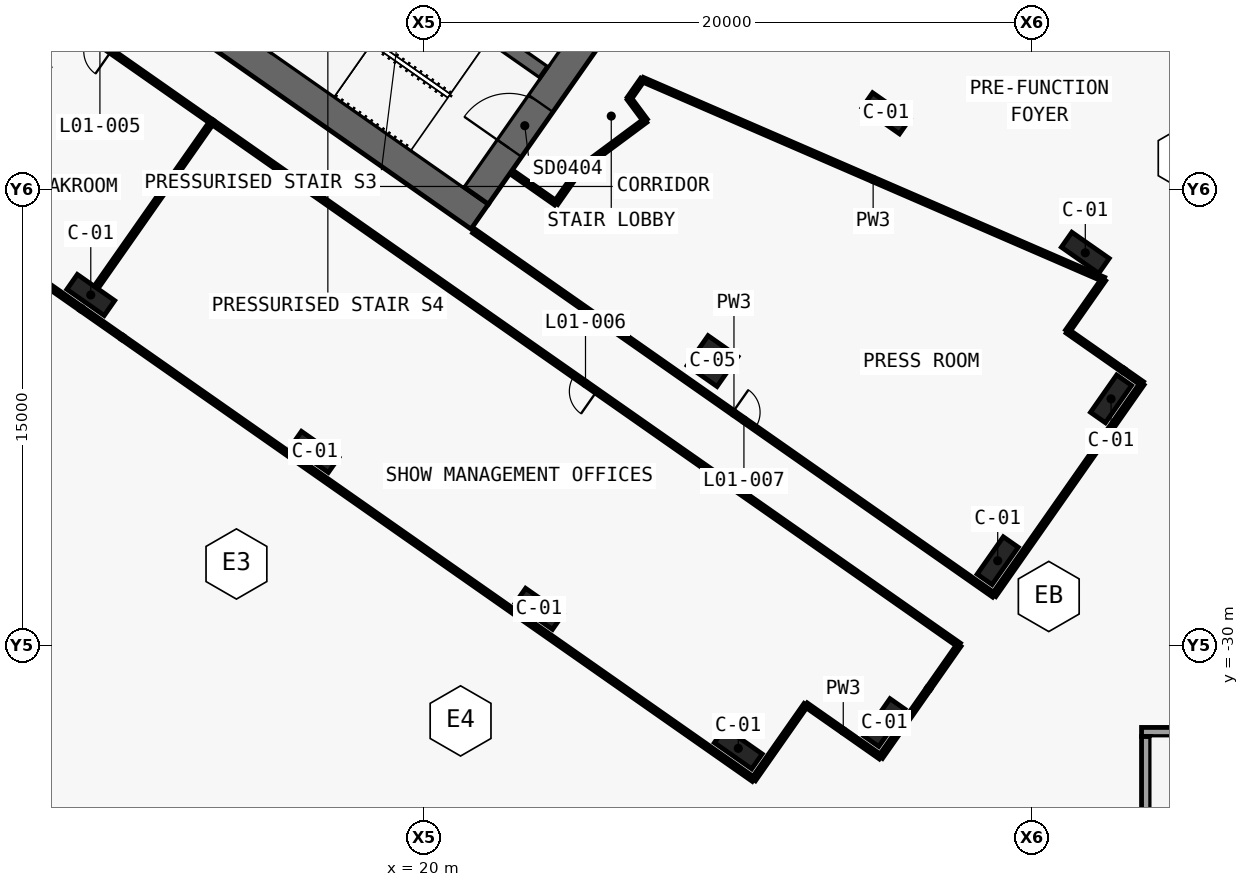
"""IFC4 building model, lengths in metres.
Left out: names, types, materials, properties, quantities, classifications, styles, units other than length and angle.
Written with IfcOpenShell. Run it as: python <this file> out.ifc"""

import sys

from ifc_helpers import new_model, si_unit, direction, frame, frame_2d, origin, origin_2d, place, context, subcontext, project, spatial, polyline, rectangle, outline, extrude, element, fill, save


model = new_model("IFC4")
c1 = context("Model", 3, precision=1e-05, world=origin(), true_north=direction((0.0, 1.0)))
c2 = subcontext(c1, "Body", "Model", "MODEL_VIEW")
j1 = project(units=[si_unit("LENGTHUNIT", "METRE"), si_unit("PLANEANGLEUNIT", "RADIAN")], contexts=[c1])
p1 = place(None, origin())
s1 = spatial("IfcSite", under=j1, at=p1, CompositionType="ELEMENT")
p2 = place(p1, origin())
s2 = spatial("IfcBuilding", under=s1, at=p2, CompositionType="ELEMENT")
p3 = place(p2, frame((0.0, 0.0, 9.0)))
s3 = spatial("IfcBuildingStorey", under=s2, at=p3, CompositionType="ELEMENT", Elevation=9.0)
p4 = place(p3, frame((-0.037, -0.585, 0.0), z_axis=(0.0, 0.0, 1.0), x_axis=(0.819157152511, -0.573569140985, 0.0)))
e1 = element("IfcWall", 1, at=p4, inside=s3, PredefinedType="SHEAR", context=c2, shape_type="SweptSolid", body=[
    extrude(outline(polyline([(26.695, 0.5), (0.0, 0.5), (0.7, -0.5), (26.695, -0.5), (26.695, 0.5)])), origin(), (0.0, 0.0, 1.0), 9.0),
])
p5 = place(p4, frame((1.045, 0.0, 0.0)))
e2 = element("IfcOpeningElement", 2, at=p5, cuts=e1, PredefinedType="OPENING", context=c2, shape_type="SweptSolid", body=[
    extrude(rectangle(XDim=1.5, YDim=2.1, at=frame_2d((0.75, 1.05))), frame((0.0, 0.51, 0.0), z_axis=(0.0, -1.0, 0.0), x_axis=(1.0, 0.0, 0.0)), (0.0, 0.0, 1.0), 1.02),
])
p6 = place(p4, frame((12.445, 0.0, 0.0)))
e3 = element("IfcOpeningElement", 3, at=p6, cuts=e1, PredefinedType="OPENING", context=c2, shape_type="SweptSolid", body=[
    extrude(rectangle(XDim=1.5, YDim=2.1, at=frame_2d((0.75, 1.05))), frame((0.0, 0.51, 0.0), z_axis=(0.0, -1.0, 0.0), x_axis=(1.0, 0.0, 0.0)), (0.0, 0.0, 1.0), 1.02),
])
p7 = place(p3, frame((21.708, -15.2, 0.0), z_axis=(0.0, 0.0, 1.0), x_axis=(0.573576324356, 0.819152122709, 0.0)))
e4 = element("IfcWall", 4, at=p7, inside=s3, PredefinedType="SHEAR", context=c2, shape_type="SweptSolid", body=[
    extrude(outline(polyline([(9.2, 0.5), (0.0, 0.5), (0.0, -0.5), (9.2, -0.5), (9.2, 0.5)])), origin(), (0.0, 0.0, 1.0), 9.0),
])
p8 = place(p7, frame((6.1, 0.0, 0.0)))
e5 = element("IfcOpeningElement", 5, at=p8, cuts=e4, PredefinedType="OPENING", context=c2, shape_type="SweptSolid", body=[
    extrude(rectangle(XDim=1.8, YDim=2.1, at=frame_2d((0.9, 1.05))), frame((0.0, 0.51, 0.0), z_axis=(0.0, -1.0, 0.0), x_axis=(1.0, 0.0, 0.0)), (0.0, 0.0, 1.0), 1.02),
])
p9 = place(p7, frame((1.9, 0.0, 0.0)))
e6 = element("IfcOpeningElement", 6, at=p9, cuts=e4, PredefinedType="OPENING", context=c2, shape_type="SweptSolid", body=[
    extrude(rectangle(XDim=1.8, YDim=2.1, at=frame_2d((0.9, 1.05))), frame((0.0, 0.51, 0.0), z_axis=(0.0, -1.0, 0.0), x_axis=(1.0, 0.0, 0.0)), (0.0, 0.0, 1.0), 1.02),
])
p10 = place(p3, frame((2.638, 3.768, 0.0), z_axis=(0.0, 0.0, 1.0), x_axis=(0.819148977158, -0.573580816643, 0.0)))
e7 = element("IfcWall", 7, at=p10, inside=s3, PredefinedType="SHEAR", context=c2, shape_type="SweptSolid", body=[
    extrude(outline(polyline([(0.0, 0.25), (0.0, -0.25), (26.0, -0.25), (26.0, 0.25), (0.0, 0.25)])), origin(), (0.0, 0.0, 1.0), 9.0),
])
p11 = place(p10, frame((9.637, 0.0, 0.0)))
e8 = element("IfcOpeningElement", 8, at=p11, cuts=e7, PredefinedType="OPENING", context=c2, shape_type="SweptSolid", body=[
    extrude(rectangle(XDim=1.2, YDim=2.1, at=frame_2d((0.6, 1.05))), frame((0.0, 0.26, 0.0), z_axis=(0.0, -1.0, 0.0), x_axis=(1.0, 0.0, 0.0)), (0.0, 0.0, 1.0), 0.52),
])
p12 = place(p10, frame((11.812, 0.0, 0.0)))
e9 = element("IfcOpeningElement", 9, at=p12, cuts=e7, PredefinedType="OPENING", context=c2, shape_type="SweptSolid", body=[
    extrude(rectangle(XDim=1.2, YDim=2.1, at=frame_2d((0.6, 1.05))), frame((0.0, 0.26, 0.0), z_axis=(0.0, -1.0, 0.0), x_axis=(1.0, 0.0, 0.0)), (0.0, 0.0, 1.0), 0.52),
])
p13 = place(p10, frame((13.988, 0.0, 0.0)))
e10 = element("IfcOpeningElement", 10, at=p13, cuts=e7, PredefinedType="OPENING", context=c2, shape_type="SweptSolid", body=[
    extrude(rectangle(XDim=1.2, YDim=2.1, at=frame_2d((0.6, 1.05))), frame((0.0, 0.26, 0.0), z_axis=(0.0, -1.0, 0.0), x_axis=(1.0, 0.0, 0.0)), (0.0, 0.0, 1.0), 0.52),
])
p14 = place(p10, frame((16.262, 0.0, 0.0)))
e11 = element("IfcOpeningElement", 11, at=p14, cuts=e7, PredefinedType="OPENING", context=c2, shape_type="SweptSolid", body=[
    extrude(rectangle(XDim=1.0, YDim=2.1, at=frame_2d((0.5, 1.05))), frame((0.0, 0.26, 0.0), z_axis=(0.0, -1.0, 0.0), x_axis=(1.0, 0.0, 0.0)), (0.0, 0.0, 1.0), 0.52),
])
p15 = place(p3, frame((43.6, -32.85, 0.0), z_axis=(0.0, 0.0, 1.0), x_axis=(1.0, 0.0, 0.0)))
e12 = element("IfcWall", 12, at=p15, inside=s3, PredefinedType="SOLIDWALL", context=c2, shape_type="SweptSolid", body=[
    extrude(rectangle(XDim=5.8, YDim=0.3, at=frame_2d((2.9, 0.0))), origin(), (0.0, 0.0, 1.0), 9.0),
])
p16 = place(p3, frame((43.75, -43.0, 0.0), z_axis=(0.0, 0.0, 1.0), x_axis=(0.0, 1.0, 0.0)))
e13 = element("IfcWall", 13, at=p16, inside=s3, PredefinedType="SOLIDWALL", context=c2, shape_type="SweptSolid", body=[
    extrude(rectangle(XDim=10.0, YDim=0.3, at=frame_2d((5.0, 0.0))), origin(), (0.0, 0.0, 1.0), 9.0),
])
p17 = place(p16, frame((0.212, 0.0, 0.0)))
e14 = element("IfcOpeningElement", 14, at=p17, cuts=e13, PredefinedType="OPENING", context=c2, shape_type="SweptSolid", body=[
    extrude(rectangle(XDim=2.1, YDim=2.1, at=frame_2d((1.05, 1.05))), frame((0.0, 0.16, 0.0), z_axis=(0.0, -1.0, 0.0), x_axis=(1.0, 0.0, 0.0)), (0.0, 0.0, 1.0), 0.32),
])
for number, where, z_axis, x_axis in (
    (15, (9.038, -18.475, 0.0), (0.0, 0.0, 1.0), (0.819, -0.574, 0.0)),
    (16, (16.41, -23.637, 0.0), (0.0, 0.0, 1.0), (0.819, -0.574, 0.0)),
    (17, (23.782, -28.799, 0.0), (0.0, 0.0, 1.0), (0.819, -0.574, 0.0)),
    (18, (30.336, -33.388, 0.0), (0.0, 0.0, 1.0), (0.819, -0.574, 0.0)),
    (19, (35.197, -12.498, 0.0), (0.0, 0.0, 1.0), (0.819, -0.574, 0.0)),
    (20, (41.75, -17.087, 0.0), (0.0, 0.0, 1.0), (0.819, -0.574, 0.0)),
    (21, (35.14, -32.541, 0.0), (0.0, 0.0, 1.0), (0.574, 0.819, 0.0)),
    (22, (38.869, -27.216, 0.0), (0.0, 0.0, 1.0), (0.574, 0.819, 0.0)),
    (23, (42.597, -21.892, 0.0), (0.0, 0.0, 1.0), (0.574, 0.819, 0.0)),
):
    element("IfcColumn", number, at=place(p3, frame(where, z_axis=z_axis, x_axis=x_axis)), inside=s3, PredefinedType="COLUMN", context=c2, shape_type="SweptSolid", body=[
        extrude(rectangle(XDim=1.5, YDim=0.6, at=origin_2d()), origin(), (0.0, 0.0, 1.0), 9.0),
    ])
p18 = place(p3, frame((29.49, -20.649, 0.0), z_axis=(0.0, 0.0, 1.0), x_axis=(0.819152044289, -0.573576436351, 0.0)))
e24 = element("IfcColumn", 24, at=p18, inside=s3, PredefinedType="COLUMN", context=c2, shape_type="SweptSolid", body=[
    extrude(rectangle(XDim=1.2, YDim=1.2, at=origin_2d()), origin(), (0.0, 0.0, 1.0), 9.0),
])
p19 = place(p3, frame((21.642, -16.375, 0.0), z_axis=(0.0, 0.0, 1.0), x_axis=(0.819148965066, -0.573580833911, 0.0)))
e25 = element("IfcWall", 25, at=p19, inside=s3, PredefinedType="PARTITIONING", context=c2, shape_type="SweptSolid", body=[
    extrude(rectangle(XDim=20.88, YDim=0.15, at=frame_2d((10.44, 0.0))), origin(), (0.0, 0.0, 1.0), 7.18),
])
p20 = place(p19, frame((10.39, 0.0, 0.0)))
e26 = element("IfcOpeningElement", 26, at=p20, cuts=e25, PredefinedType="OPENING", context=c2, shape_type="SweptSolid", body=[
    extrude(rectangle(XDim=0.9, YDim=2.1, at=frame_2d((0.45, 1.05))), frame((0.0, 0.085, 0.0), z_axis=(0.0, -1.0, 0.0), x_axis=(1.0, 0.0, 0.0)), (0.0, 0.0, 1.0), 0.17),
])
p21 = place(p3, frame((13.026, -12.783, 0.0), z_axis=(0.0, 0.0, 1.0), x_axis=(-0.81915291695, 0.57357519006, 0.0)))
e27 = element("IfcWall", 27, at=p21, inside=s3, PredefinedType="PARTITIONING", context=c2, shape_type="SweptSolid", body=[
    extrude(rectangle(XDim=9.002, YDim=0.15, at=frame_2d((4.501, 0.0))), origin(), (0.0, 0.0, 1.0), 7.18),
])
p22 = place(p21, frame((4.051, 0.0, 0.0)))
e28 = element("IfcOpeningElement", 28, at=p22, cuts=e27, PredefinedType="OPENING", context=c2, shape_type="SweptSolid", body=[
    extrude(rectangle(XDim=0.9, YDim=2.1, at=frame_2d((0.45, 1.05))), frame((0.0, 0.085, 0.0), z_axis=(0.0, -1.0, 0.0), x_axis=(1.0, 0.0, 0.0)), (0.0, 0.0, 1.0), 0.17),
])
p23 = place(p3, frame((37.599, -29.989, 0.0), z_axis=(0.0, 0.0, 1.0), x_axis=(-0.819154688631, 0.57357265982, 0.0)))
e29 = element("IfcWall", 29, at=p23, inside=s3, PredefinedType="PARTITIONING", context=c2, shape_type="SweptSolid", body=[
    extrude(rectangle(XDim=30.002, YDim=0.15, at=frame_2d((15.001, 0.0))), origin(), (0.0, 0.0, 1.0), 7.18),
])
p24 = place(p23, frame((14.551, 0.0, 0.0)))
e30 = element("IfcOpeningElement", 30, at=p24, cuts=e29, PredefinedType="OPENING", context=c2, shape_type="SweptSolid", body=[
    extrude(rectangle(XDim=0.9, YDim=2.1, at=frame_2d((0.45, 1.05))), frame((0.0, 0.085, 0.0), z_axis=(0.0, -1.0, 0.0), x_axis=(1.0, 0.0, 0.0)), (0.0, 0.0, 1.0), 0.17),
])
p25 = place(p3, frame((42.357, -17.962, 0.0), z_axis=(0.0, 0.0, 1.0), x_axis=(-0.573533201177, -0.819182316183, 0.0)))
e31 = element("IfcWall", 31, at=p25, inside=s3, PredefinedType="PARTITIONING", context=c2, shape_type="SweptSolid", body=[
    extrude(rectangle(XDim=2.081, YDim=0.15, at=frame_2d((1.041, 0.0))), origin(), (0.0, 0.0, 1.0), 7.38),
])
p26 = place(p3, frame((41.164, -19.667, 0.0), z_axis=(0.0, 0.0, 1.0), x_axis=(0.81912956014, -0.573608545704, 0.0)))
e32 = element("IfcWall", 32, at=p26, inside=s3, PredefinedType="PARTITIONING", context=c2, shape_type="SweptSolid", body=[
    extrude(rectangle(XDim=2.241, YDim=0.15, at=frame_2d((1.121, 0.0))), origin(), (0.0, 0.0, 1.0), 7.38),
])
p27 = place(p3, frame((42.998, -20.952, 0.0), z_axis=(0.0, 0.0, 1.0), x_axis=(0.819141432686, -0.573591590992, 0.0)))
e33 = element("IfcWall", 33, at=p27, inside=s3, PredefinedType="PARTITIONING", context=c2, shape_type="SweptSolid", body=[
    extrude(rectangle(XDim=0.76, YDim=0.15, at=frame_2d((0.38, 0.0))), origin(), (0.0, 0.0, 1.0), 8.6),
])
p28 = place(p3, frame((43.621, -21.388, 0.0), z_axis=(0.0, 0.0, 1.0), x_axis=(-0.57357799764, -0.819150951061, 0.0)))
e34 = element("IfcWall", 34, at=p28, inside=s3, PredefinedType="PARTITIONING", context=c2, shape_type="SweptSolid", body=[
    extrude(rectangle(XDim=8.5, YDim=0.15, at=frame_2d((4.25, 0.0))), origin(), (0.0, 0.0, 1.0), 8.6),
])
p29 = place(p3, frame((26.746, -12.014, 0.0), z_axis=(0.0, 0.0, 1.0), x_axis=(0.573761975376, 0.819022097146, 0.0)))
e35 = element("IfcWall", 35, at=p29, inside=s3, PredefinedType="PARTITIONING", context=c2, shape_type="SweptSolid", body=[
    extrude(rectangle(XDim=0.765, YDim=0.15, at=frame_2d((0.383, 0.0))), origin(), (0.0, 0.0, 1.0), 8.6),
])
p30 = place(p3, frame((27.185, -11.387, 0.0), z_axis=(0.0, 0.0, 1.0), x_axis=(0.917531384635, -0.397663372979, 0.0)))
e36 = element("IfcWall", 36, at=p30, inside=s3, PredefinedType="PARTITIONING", context=c2, shape_type="SweptSolid", body=[
    extrude(rectangle(XDim=16.536, YDim=0.15, at=frame_2d((8.268, 0.0))), origin(), (0.0, 0.0, 1.0), 7.18),
])
p31 = place(p3, frame((22.961, -14.49, 0.0), z_axis=(0.0, 0.0, 1.0), x_axis=(0.819109000826, -0.573637903879, 0.0)))
e37 = element("IfcWall", 37, at=p31, inside=s3, PredefinedType="PARTITIONING", context=c2, shape_type="SweptSolid", body=[
    extrude(rectangle(XDim=1.68, YDim=0.15, at=frame_2d((0.84, 0.0))), origin(), (0.0, 0.0, 1.0), 8.6),
])
p32 = place(p3, frame((24.337, -15.454, 0.0), z_axis=(0.0, 0.0, 1.0), x_axis=(0.573571252353, 0.819155674139, 0.0)))
e38 = element("IfcWall", 38, at=p32, inside=s3, PredefinedType="PARTITIONING", context=c2, shape_type="SweptSolid", body=[
    extrude(rectangle(XDim=1.354, YDim=0.15, at=frame_2d((0.677, 0.0))), origin(), (0.0, 0.0, 1.0), 8.6),
])
p33 = place(p3, frame((25.114, -14.345, 0.0), z_axis=(0.0, 0.0, 1.0), x_axis=(0.803211070557, 0.595694532571, 0.0)))
e39 = element("IfcWall", 39, at=p33, inside=s3, PredefinedType="PARTITIONING", context=c2, shape_type="SweptSolid", body=[
    extrude(rectangle(XDim=2.7, YDim=0.15, at=frame_2d((1.35, 0.0))), origin(), (0.0, 0.0, 1.0), 8.6),
])
p34 = place(p3, frame((27.282, -12.737, 0.0), z_axis=(0.0, 0.0, 1.0), x_axis=(-0.595869495235, 0.803081281471, 0.0)))
e40 = element("IfcWall", 40, at=p34, inside=s3, PredefinedType="PARTITIONING", context=c2, shape_type="SweptSolid", body=[
    extrude(rectangle(XDim=0.9, YDim=0.15, at=frame_2d((0.45, 0.0))), origin(), (0.0, 0.0, 1.0), 8.6),
])
p35 = place(p3, frame((13.024, -12.782, 0.0), z_axis=(0.0, 0.0, 1.0), x_axis=(-0.573556251799, -0.819166177294, 0.0)))
e41 = element("IfcWall", 41, at=p35, inside=s3, PredefinedType="PARTITIONING", context=c2, shape_type="SweptSolid", body=[
    extrude(rectangle(XDim=6.63, YDim=0.15, at=frame_2d((3.315, 0.0))), origin(), (0.0, 0.0, 1.0), 7.18),
])
p36 = place(p3, frame((8.722, -18.926, 0.0), z_axis=(0.0, 0.0, 1.0), x_axis=(-0.819141427692, 0.573591598124, 0.0)))
e42 = element("IfcWall", 42, at=p36, inside=s3, PredefinedType="PARTITIONING", context=c2, shape_type="SweptSolid", body=[
    extrude(rectangle(XDim=9.0, YDim=0.15, at=frame_2d((4.5, 0.0))), origin(), (0.0, 0.0, 1.0), 8.6),
])
p37 = place(p3, frame((32.56, -31.955, 0.0), z_axis=(0.0, 0.0, 1.0), x_axis=(-0.573560650686, -0.819163097304, 0.0)))
e43 = element("IfcWall", 43, at=p37, inside=s3, PredefinedType="PARTITIONING", context=c2, shape_type="SweptSolid", body=[
    extrude(rectangle(XDim=3.0, YDim=0.15, at=frame_2d((1.5, 0.0))), origin(), (0.0, 0.0, 1.0), 7.38),
])
p38 = place(p3, frame((30.839, -34.412, 0.0), z_axis=(0.0, 0.0, 1.0), x_axis=(-0.819153188106, 0.573574802808, 0.0)))
e44 = element("IfcWall", 44, at=p38, inside=s3, PredefinedType="PARTITIONING", context=c2, shape_type="SweptSolid", body=[
    extrude(rectangle(XDim=25.351, YDim=0.15, at=frame_2d((12.675, 0.0))), origin(), (0.0, 0.0, 1.0), 8.6),
])
p39 = place(p3, frame((36.599, -31.417, 0.0), z_axis=(0.0, 0.0, 1.0), x_axis=(-0.573557416232, -0.819165361991, 0.0)))
e45 = element("IfcWall", 45, at=p39, inside=s3, PredefinedType="PARTITIONING", context=c2, shape_type="SweptSolid", body=[
    extrude(rectangle(XDim=2.757, YDim=0.15, at=frame_2d((1.379, 0.0))), origin(), (0.0, 0.0, 1.0), 8.6),
])
p40 = place(p3, frame((35.018, -33.675, 0.0), z_axis=(0.0, 0.0, 1.0), x_axis=(-0.819163097304, 0.573560650686, 0.0)))
e46 = element("IfcWall", 46, at=p40, inside=s3, PredefinedType="PARTITIONING", context=c2, shape_type="SweptSolid", body=[
    extrude(rectangle(XDim=3.0, YDim=0.15, at=frame_2d((1.5, 0.0))), origin(), (0.0, 0.0, 1.0), 7.38),
])
p41 = place(p3, frame((37.599, -29.989, 0.0), z_axis=(0.0, 0.0, 1.0), x_axis=(-0.573575034625, -0.819153025786, 0.0)))
e47 = element("IfcWall", 47, at=p41, inside=s3, PredefinedType="PARTITIONING", context=c2, shape_type="SweptSolid", body=[
    extrude(rectangle(XDim=1.745, YDim=0.15, at=frame_2d((0.872, 0.0))), origin(), (0.0, 0.0, 1.0), 8.6),
])
p42 = place(p3, frame((10.075, -19.873, 0.0), z_axis=(0.0, 0.0, 1.0), x_axis=(-0.819190252408, 0.573521865634, 0.0)))
e48 = element("IfcWall", 48, at=p42, inside=s3, PredefinedType="PARTITIONING", context=c2, shape_type="SweptSolid", body=[
    extrude(rectangle(XDim=1.652, YDim=0.15, at=frame_2d((0.826, 0.0))), origin(), (0.0, 0.0, 1.0), 7.58),
])
p43 = place(p9, origin())
e49 = element("IfcDoor", 49, at=p43, inside=s3, OperationType="DOUBLE_DOOR_SINGLE_SWING", PredefinedType="DOOR", context=c2, shape_type="SweptSolid", body=[
    extrude(rectangle(XDim=1.8, YDim=2.1, at=frame_2d((0.9, 1.05))), frame((0.0, 0.025, 0.0), z_axis=(0.0, -1.0, 0.0), x_axis=(1.0, 0.0, 0.0)), (0.0, 0.0, 1.0), 0.05),
])
fill(e6, e49)
p44 = place(p22, origin())
e50 = element("IfcDoor", 50, at=p44, inside=s3, OperationType="SINGLE_SWING_RIGHT", PredefinedType="DOOR", context=c2, shape_type="SweptSolid", body=[
    extrude(rectangle(XDim=0.9, YDim=2.1, at=frame_2d((0.45, 1.05))), frame((0.0, 0.025, 0.0), z_axis=(0.0, -1.0, 0.0), x_axis=(1.0, 0.0, 0.0)), (0.0, 0.0, 1.0), 0.05),
])
fill(e28, e50)
p45 = place(p24, origin())
e51 = element("IfcDoor", 51, at=p45, inside=s3, OperationType="SINGLE_SWING_RIGHT", PredefinedType="DOOR", context=c2, shape_type="SweptSolid", body=[
    extrude(rectangle(XDim=0.9, YDim=2.1, at=frame_2d((0.45, 1.05))), frame((0.0, 0.025, 0.0), z_axis=(0.0, -1.0, 0.0), x_axis=(1.0, 0.0, 0.0)), (0.0, 0.0, 1.0), 0.05),
])
fill(e30, e51)
p46 = place(p20, origin())
e52 = element("IfcDoor", 52, at=p46, inside=s3, OperationType="SINGLE_SWING_LEFT", PredefinedType="DOOR", context=c2, shape_type="SweptSolid", body=[
    extrude(rectangle(XDim=0.9, YDim=2.1, at=frame_2d((0.45, 1.05))), frame((0.0, 0.025, 0.0), z_axis=(0.0, -1.0, 0.0), x_axis=(1.0, 0.0, 0.0)), (0.0, 0.0, 1.0), 0.05),
])
fill(e26, e52)
save(model, sys.argv[1])
